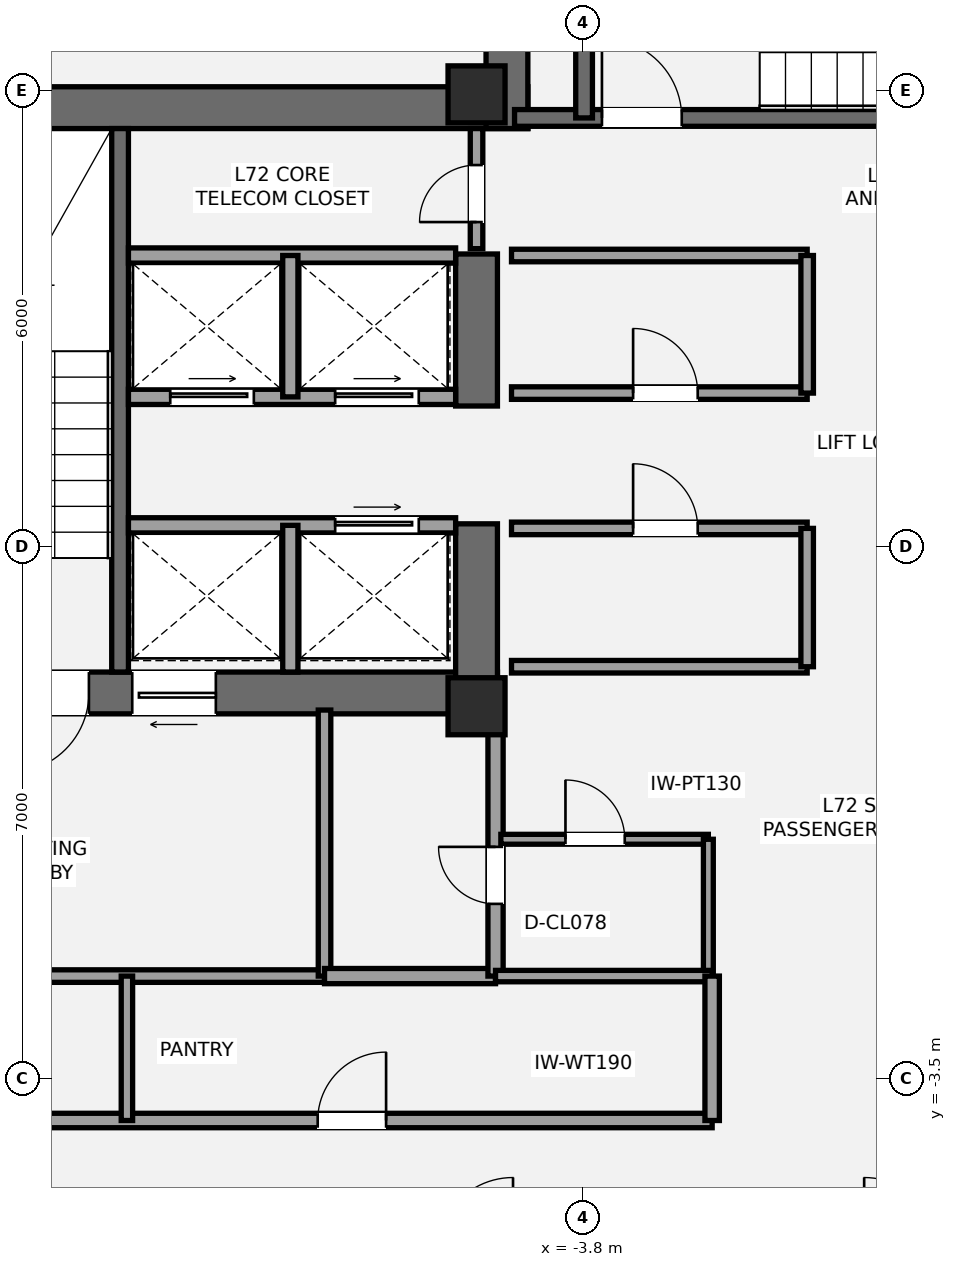
"""IFC4 building model, lengths in metres.
Left out: names, types, materials, properties, quantities, classifications, styles, units other than length and angle.
Written with IfcOpenShell. Run it as: python <this file> out.ifc"""

import sys

from ifc_helpers import new_model, si_unit, direction, frame, frame_2d, origin, origin_2d, place, context, subcontext, project, spatial, rectangle, extrude, element, fill, save


model = new_model("IFC4")
c1 = context("Model", 3, precision=1e-05, world=origin(), true_north=direction((0.0, 1.0)))
c2 = subcontext(c1, "Body", "Model", "MODEL_VIEW")
j1 = project(units=[si_unit("LENGTHUNIT", "METRE"), si_unit("PLANEANGLEUNIT", "RADIAN")], contexts=[c1])
p1 = place(None, origin())
s1 = spatial("IfcSite", under=j1, at=p1, CompositionType="ELEMENT")
p2 = place(p1, origin())
s2 = spatial("IfcBuilding", under=s1, at=p2, CompositionType="ELEMENT")
p3 = place(p2, frame((0.0, 0.0, 254.1)))
s3 = spatial("IfcBuildingStorey", under=s2, at=p3, CompositionType="ELEMENT", Elevation=254.1)
p4 = place(p3, frame((-13.7, 9.275, 0.0), z_axis=(0.0, 0.0, 1.0), x_axis=(1.0, 0.0, 0.0)))
e1 = element("IfcWall", 1, at=p4, inside=s3, PredefinedType="SHEAR", context=c2, shape_type="SweptSolid", body=[
    extrude(rectangle(XDim=9.175, YDim=0.55, at=frame_2d((4.587, 0.0))), origin(), (0.0, 0.0, 1.0), 3.15),
])
p5 = place(p3, frame((-4.925, 1.575, 0.0), z_axis=(0.0, 0.0, 1.0), x_axis=(-1.0, 0.0, 0.0)))
e2 = element("IfcWall", 2, at=p5, inside=s3, PredefinedType="SHEAR", context=c2, shape_type="SweptSolid", body=[
    extrude(rectangle(XDim=8.775, YDim=0.55, at=frame_2d((4.387, 0.0))), origin(), (0.0, 0.0, 1.0), 3.15),
])
p6 = place(p5, frame((5.375, 0.0, 0.0)))
e3 = element("IfcOpeningElement", 3, at=p6, cuts=e2, PredefinedType="OPENING", context=c2, shape_type="SweptSolid", body=[
    extrude(rectangle(XDim=1.05, YDim=2.15, at=frame_2d((0.525, 1.075))), frame((0.0, 0.285, 0.0), z_axis=(0.0, -1.0, 0.0), x_axis=(1.0, 0.0, 0.0)), (0.0, 0.0, 1.0), 0.57),
])
p7 = place(p5, frame((3.705, 0.0, 0.0)))
e4 = element("IfcOpeningElement", 4, at=p7, cuts=e2, PredefinedType="OPENING", context=c2, shape_type="SweptSolid", body=[
    extrude(rectangle(XDim=1.1, YDim=2.2, at=frame_2d((0.55, 1.1))), frame((0.0, 0.285, 0.0), z_axis=(0.0, -1.0, 0.0), x_axis=(1.0, 0.0, 0.0)), (0.0, 0.0, 1.0), 0.57),
])
p8 = place(p3, frame((-5.2, 1.3, 0.0), z_axis=(0.0, 0.0, 1.0), x_axis=(0.0, 1.0, 0.0)))
e5 = element("IfcWall", 5, at=p8, inside=s3, PredefinedType="SHEAR", context=c2, shape_type="SweptSolid", body=[
    extrude(rectangle(XDim=2.5, YDim=0.55, at=frame_2d((1.25, 0.0))), origin(), (0.0, 0.0, 1.0), 3.15),
])
p9 = place(p3, frame((-5.2, 5.35, 0.0), z_axis=(0.0, 0.0, 1.0), x_axis=(0.0, 1.0, 0.0)))
e6 = element("IfcWall", 6, at=p9, inside=s3, PredefinedType="SHEAR", context=c2, shape_type="SweptSolid", body=[
    extrude(rectangle(XDim=2.0, YDim=0.55, at=frame_2d((1.0, 0.0))), origin(), (0.0, 0.0, 1.0), 3.15),
])
p10 = place(p3, frame((-9.89, 1.85, 0.0), z_axis=(0.0, 0.0, 1.0), x_axis=(0.0, 1.0, 0.0)))
e7 = element("IfcWall", 7, at=p10, inside=s3, PredefinedType="SHEAR", context=c2, shape_type="SweptSolid", body=[
    extrude(rectangle(XDim=7.15, YDim=0.22, at=frame_2d((3.575, 0.0))), origin(), (0.0, 0.0, 1.0), 3.15),
])
p11 = place(p3, frame((-4.8, 9.0, 0.0), z_axis=(0.0, 0.0, 1.0), x_axis=(0.0, 1.0, 0.0)))
e8 = element("IfcWall", 8, at=p11, inside=s3, PredefinedType="SHEAR", context=c2, shape_type="SweptSolid", body=[
    extrude(rectangle(XDim=3.95, YDim=0.55, at=frame_2d((1.975, 0.0))), origin(), (0.0, 0.0, 1.0), 3.15),
])
p12 = place(p3, frame((-4.7, 9.14, 0.0), z_axis=(0.0, 0.0, 1.0), x_axis=(1.0, 0.0, 0.0)))
e9 = element("IfcWall", 9, at=p12, inside=s3, PredefinedType="SHEAR", context=c2, shape_type="SweptSolid", body=[
    extrude(rectangle(XDim=9.3, YDim=0.22, at=frame_2d((4.65, 0.0))), origin(), (0.0, 0.0, 1.0), 3.15),
])
p13 = place(p12, frame((1.15, 0.0, 0.0)))
e10 = element("IfcOpeningElement", 10, at=p13, cuts=e9, PredefinedType="OPENING", context=c2, shape_type="SweptSolid", body=[
    extrude(rectangle(XDim=1.05, YDim=2.15, at=frame_2d((0.525, 1.075))), frame((0.0, 0.12, 0.0), z_axis=(0.0, -1.0, 0.0), x_axis=(1.0, 0.0, 0.0)), (0.0, 0.0, 1.0), 0.24),
])
p14 = place(p3, frame((-3.785, 9.14, 0.0), z_axis=(0.0, 0.0, 1.0), x_axis=(0.0, 1.0, 0.0)))
e11 = element("IfcWall", 11, at=p14, inside=s3, PredefinedType="SHEAR", context=c2, shape_type="SweptSolid", body=[
    extrude(rectangle(XDim=3.26, YDim=0.22, at=frame_2d((1.63, 0.0))), origin(), (0.0, 0.0, 1.0), 3.15),
])
for number, where, z_axis, x_axis in (
    (12, (-5.2, 1.4, 0.0), (0.0, 0.0, 1.0), (1.0, 0.0, 0.0)),
    (13, (-5.2, 9.45, 0.0), (0.0, 0.0, 1.0), (1.0, 0.0, 0.0)),
):
    element("IfcColumn", number, at=place(p3, frame(where, z_axis=z_axis, x_axis=x_axis)), inside=s3, PredefinedType="PILASTER", context=c2, shape_type="SweptSolid", body=[
        extrude(rectangle(XDim=0.75, YDim=0.75, at=origin_2d()), origin(), (0.0, 0.0, 1.0), 3.15),
    ])
p15 = place(p3, frame((-13.45, -2.15, 0.0), z_axis=(0.0, 0.0, 1.0), x_axis=(1.0, 0.0, 0.0)))
e14 = element("IfcWall", 14, at=p15, inside=s3, PredefinedType="PARTITIONING", context=c2, shape_type="SweptSolid", body=[
    extrude(rectangle(XDim=6.25, YDim=0.165, at=frame_2d((3.125, 0.0))), origin(), (0.0, 0.0, 1.0), 2.423),
])
p16 = place(p3, frame((-7.2, -2.15, 0.0), z_axis=(0.0, 0.0, 1.0), x_axis=(0.0, 1.0, 0.0)))
e15 = element("IfcWall", 15, at=p16, inside=s3, PredefinedType="PARTITIONING", context=c2, shape_type="SweptSolid", body=[
    extrude(rectangle(XDim=3.5, YDim=0.165, at=frame_2d((1.75, 0.0))), origin(), (0.0, 0.0, 1.0), 2.423),
])
p17 = place(p3, frame((-7.2, -2.15, 0.0), z_axis=(0.0, 0.0, 1.0), x_axis=(1.0, 0.0, 0.0)))
e16 = element("IfcWall", 16, at=p17, inside=s3, PredefinedType="SOLIDWALL", context=c2, shape_type="SweptSolid", body=[
    extrude(rectangle(XDim=2.25, YDim=0.2, at=frame_2d((1.125, 0.0))), origin(), (0.0, 0.0, 1.0), 2.97),
])
p18 = place(p3, frame((-4.95, -2.15, 0.0), z_axis=(0.0, 0.0, 1.0), x_axis=(0.0, 1.0, 0.0)))
e17 = element("IfcWall", 17, at=p18, inside=s3, PredefinedType="SOLIDWALL", context=c2, shape_type="SweptSolid", body=[
    extrude(rectangle(XDim=3.5, YDim=0.2, at=frame_2d((1.75, 0.0))), origin(), (0.0, 0.0, 1.0), 2.423),
])
p19 = place(p18, frame((0.95, 0.0, 0.0)))
e18 = element("IfcOpeningElement", 18, at=p19, cuts=e17, PredefinedType="OPENING", context=c2, shape_type="SweptSolid", body=[
    extrude(rectangle(XDim=0.75, YDim=2.1, at=frame_2d((0.375, 1.05))), frame((0.0, 0.11, 0.0), z_axis=(0.0, -1.0, 0.0), x_axis=(1.0, 0.0, 0.0)), (0.0, 0.0, 1.0), 0.22),
])
p20 = place(p3, frame((-4.88, -0.35, 0.0), z_axis=(0.0, 0.0, 1.0), x_axis=(1.0, 0.0, 0.0)))
e19 = element("IfcWall", 19, at=p20, inside=s3, PredefinedType="PARTITIONING", context=c2, shape_type="SweptSolid", body=[
    extrude(rectangle(XDim=2.73, YDim=0.13, at=frame_2d((1.365, 0.0))), origin(), (0.0, 0.0, 1.0), 2.97),
])
p21 = place(p20, frame((0.85, 0.0, 0.0)))
e20 = element("IfcOpeningElement", 20, at=p21, cuts=e19, PredefinedType="OPENING", context=c2, shape_type="SweptSolid", body=[
    extrude(rectangle(XDim=0.78, YDim=2.1, at=frame_2d((0.39, 1.05))), frame((0.0, 0.075, 0.0), z_axis=(0.0, -1.0, 0.0), x_axis=(1.0, 0.0, 0.0)), (0.0, 0.0, 1.0), 0.15),
])
p22 = place(p3, frame((-2.15, -2.15, 0.0), z_axis=(0.0, 0.0, 1.0), x_axis=(0.0, 1.0, 0.0)))
e21 = element("IfcWall", 21, at=p22, inside=s3, PredefinedType="PARTITIONING", context=c2, shape_type="SweptSolid", body=[
    extrude(rectangle(XDim=1.8, YDim=0.13, at=frame_2d((0.9, 0.0))), origin(), (0.0, 0.0, 1.0), 2.97),
])
p23 = place(p3, frame((-9.78, 3.78, 0.0), z_axis=(0.0, 0.0, 1.0), x_axis=(1.0, 0.0, 0.0)))
e22 = element("IfcWall", 22, at=p23, inside=s3, PredefinedType="SOLIDWALL", context=c2, shape_type="SweptSolid", body=[
    extrude(rectangle(XDim=4.305, YDim=0.2, at=frame_2d((2.152, 0.0))), origin(), (0.0, 0.0, 1.0), 2.97),
])
p24 = place(p23, frame((2.72, 0.0, 0.0)))
e23 = element("IfcOpeningElement", 23, at=p24, cuts=e22, PredefinedType="OPENING", context=c2, shape_type="SweptSolid", body=[
    extrude(rectangle(XDim=1.1, YDim=2.2, at=frame_2d((0.55, 1.1))), frame((0.0, 0.11, 0.0), z_axis=(0.0, -1.0, 0.0), x_axis=(1.0, 0.0, 0.0)), (0.0, 0.0, 1.0), 0.22),
])
p25 = place(p3, frame((-7.65, 1.85, 0.0), z_axis=(0.0, 0.0, 1.0), x_axis=(0.0, 1.0, 0.0)))
e24 = element("IfcWall", 24, at=p25, inside=s3, PredefinedType="SOLIDWALL", context=c2, shape_type="SweptSolid", body=[
    extrude(rectangle(XDim=1.93, YDim=0.2, at=frame_2d((0.965, 0.0))), origin(), (0.0, 0.0, 1.0), 2.97),
])
p26 = place(p3, frame((-9.78, 5.47, 0.0), z_axis=(0.0, 0.0, 1.0), x_axis=(1.0, 0.0, 0.0)))
e25 = element("IfcWall", 25, at=p26, inside=s3, PredefinedType="SOLIDWALL", context=c2, shape_type="SweptSolid", body=[
    extrude(rectangle(XDim=4.305, YDim=0.2, at=frame_2d((2.152, 0.0))), origin(), (0.0, 0.0, 1.0), 2.97),
])
p27 = place(p26, frame((0.55, 0.0, 0.0)))
e26 = element("IfcOpeningElement", 26, at=p27, cuts=e25, PredefinedType="OPENING", context=c2, shape_type="SweptSolid", body=[
    extrude(rectangle(XDim=1.1, YDim=2.2, at=frame_2d((0.55, 1.1))), frame((0.0, 0.11, 0.0), z_axis=(0.0, -1.0, 0.0), x_axis=(1.0, 0.0, 0.0)), (0.0, 0.0, 1.0), 0.22),
])
p28 = place(p26, frame((2.72, 0.0, 0.0)))
e27 = element("IfcOpeningElement", 27, at=p28, cuts=e25, PredefinedType="OPENING", context=c2, shape_type="SweptSolid", body=[
    extrude(rectangle(XDim=1.1, YDim=2.2, at=frame_2d((0.55, 1.1))), frame((0.0, 0.11, 0.0), z_axis=(0.0, -1.0, 0.0), x_axis=(1.0, 0.0, 0.0)), (0.0, 0.0, 1.0), 0.22),
])
p29 = place(p3, frame((-9.78, 7.33, 0.0), z_axis=(0.0, 0.0, 1.0), x_axis=(1.0, 0.0, 0.0)))
e28 = element("IfcWall", 28, at=p29, inside=s3, PredefinedType="SOLIDWALL", context=c2, shape_type="SweptSolid", body=[
    extrude(rectangle(XDim=4.305, YDim=0.2, at=frame_2d((2.152, 0.0))), origin(), (0.0, 0.0, 1.0), 2.97),
])
p30 = place(p3, frame((-7.65, 5.47, 0.0), z_axis=(0.0, 0.0, 1.0), x_axis=(0.0, 1.0, 0.0)))
e29 = element("IfcWall", 29, at=p30, inside=s3, PredefinedType="SOLIDWALL", context=c2, shape_type="SweptSolid", body=[
    extrude(rectangle(XDim=1.86, YDim=0.2, at=frame_2d((0.93, 0.0))), origin(), (0.0, 0.0, 1.0), 2.97),
])
p31 = place(p3, frame((-4.74, 1.92, 0.0), z_axis=(0.0, 0.0, 1.0), x_axis=(1.0, 0.0, 0.0)))
e30 = element("IfcWall", 30, at=p31, inside=s3, PredefinedType="PARTITIONING", context=c2, shape_type="SweptSolid", body=[
    extrude(rectangle(XDim=3.89, YDim=0.165, at=frame_2d((1.945, 0.0))), origin(), (0.0, 0.0, 1.0), 2.11),
])
p32 = place(p3, frame((-4.74, 3.74, 0.0), z_axis=(0.0, 0.0, 1.0), x_axis=(1.0, 0.0, 0.0)))
e31 = element("IfcWall", 31, at=p32, inside=s3, PredefinedType="PARTITIONING", context=c2, shape_type="SweptSolid", body=[
    extrude(rectangle(XDim=3.89, YDim=0.165, at=frame_2d((1.945, 0.0))), origin(), (0.0, 0.0, 1.0), 2.97),
])
p33 = place(p32, frame((1.6, 0.0, 0.0)))
e32 = element("IfcOpeningElement", 32, at=p33, cuts=e31, PredefinedType="OPENING", context=c2, shape_type="SweptSolid", body=[
    extrude(rectangle(XDim=0.85, YDim=2.1, at=frame_2d((0.425, 1.05))), frame((0.0, 0.093, 0.0), z_axis=(0.0, -1.0, 0.0), x_axis=(1.0, 0.0, 0.0)), (0.0, 0.0, 1.0), 0.185),
])
p34 = place(p3, frame((-0.85, 1.92, 0.0), z_axis=(0.0, 0.0, 1.0), x_axis=(0.0, 1.0, 0.0)))
e33 = element("IfcWall", 33, at=p34, inside=s3, PredefinedType="PARTITIONING", context=c2, shape_type="SweptSolid", body=[
    extrude(rectangle(XDim=1.82, YDim=0.165, at=frame_2d((0.91, 0.0))), origin(), (0.0, 0.0, 1.0), 2.97),
])
p35 = place(p3, frame((-4.74, 5.52, 0.0), z_axis=(0.0, 0.0, 1.0), x_axis=(1.0, 0.0, 0.0)))
e34 = element("IfcWall", 34, at=p35, inside=s3, PredefinedType="PARTITIONING", context=c2, shape_type="SweptSolid", body=[
    extrude(rectangle(XDim=3.89, YDim=0.165, at=frame_2d((1.945, 0.0))), origin(), (0.0, 0.0, 1.0), 2.97),
])
p36 = place(p35, frame((1.6, 0.0, 0.0)))
e35 = element("IfcOpeningElement", 35, at=p36, cuts=e34, PredefinedType="OPENING", context=c2, shape_type="SweptSolid", body=[
    extrude(rectangle(XDim=0.85, YDim=2.1, at=frame_2d((0.425, 1.05))), frame((0.0, 0.093, 0.0), z_axis=(0.0, -1.0, 0.0), x_axis=(1.0, 0.0, 0.0)), (0.0, 0.0, 1.0), 0.185),
])
p37 = place(p3, frame((-4.74, 7.33, 0.0), z_axis=(0.0, 0.0, 1.0), x_axis=(1.0, 0.0, 0.0)))
e36 = element("IfcWall", 36, at=p37, inside=s3, PredefinedType="PARTITIONING", context=c2, shape_type="SweptSolid", body=[
    extrude(rectangle(XDim=3.89, YDim=0.165, at=frame_2d((1.945, 0.0))), origin(), (0.0, 0.0, 1.0), 2.97),
])
p38 = place(p3, frame((-0.85, 5.52, 0.0), z_axis=(0.0, 0.0, 1.0), x_axis=(0.0, 1.0, 0.0)))
e37 = element("IfcWall", 37, at=p38, inside=s3, PredefinedType="PARTITIONING", context=c2, shape_type="SweptSolid", body=[
    extrude(rectangle(XDim=1.81, YDim=0.165, at=frame_2d((0.905, 0.0))), origin(), (0.0, 0.0, 1.0), 2.97),
])
p39 = place(p3, frame((-5.2, 7.42, 0.0), z_axis=(0.0, 0.0, 1.0), x_axis=(0.0, 1.0, 0.0)))
e38 = element("IfcWall", 38, at=p39, inside=s3, PredefinedType="PARTITIONING", context=c2, shape_type="SweptSolid", body=[
    extrude(rectangle(XDim=1.58, YDim=0.165, at=frame_2d((0.79, 0.0))), origin(), (0.0, 0.0, 1.0), 2.97),
])
p40 = place(p39, frame((0.35, 0.0, 0.0)))
e39 = element("IfcOpeningElement", 39, at=p40, cuts=e38, PredefinedType="OPENING", context=c2, shape_type="SweptSolid", body=[
    extrude(rectangle(XDim=0.75, YDim=2.1, at=frame_2d((0.375, 1.05))), frame((0.0, 0.093, 0.0), z_axis=(0.0, -1.0, 0.0), x_axis=(1.0, 0.0, 0.0)), (0.0, 0.0, 1.0), 0.185),
])
p41 = place(p3, frame((-13.45, -4.05, 0.0), z_axis=(0.0, 0.0, 1.0), x_axis=(1.0, 0.0, 0.0)))
e40 = element("IfcWall", 40, at=p41, inside=s3, PredefinedType="PLUMBINGWALL", context=c2, shape_type="SweptSolid", body=[
    extrude(rectangle(XDim=11.35, YDim=0.19, at=frame_2d((5.675, 0.0))), origin(), (0.0, 0.0, 1.0), 2.357),
])
p42 = place(p41, frame((1.25, 0.0, 0.0)))
e41 = element("IfcOpeningElement", 41, at=p42, cuts=e40, PredefinedType="OPENING", context=c2, shape_type="SweptSolid", body=[
    extrude(rectangle(XDim=0.95, YDim=2.15, at=frame_2d((0.475, 1.075))), frame((0.0, 0.105, 0.0), z_axis=(0.0, -1.0, 0.0), x_axis=(1.0, 0.0, 0.0)), (0.0, 0.0, 1.0), 0.21),
])
p43 = place(p41, frame((6.16, 0.0, 0.0)))
e42 = element("IfcOpeningElement", 42, at=p43, cuts=e40, PredefinedType="OPENING", context=c2, shape_type="SweptSolid", body=[
    extrude(rectangle(XDim=0.9, YDim=2.1, at=frame_2d((0.45, 1.05))), frame((0.0, 0.105, 0.0), z_axis=(0.0, -1.0, 0.0), x_axis=(1.0, 0.0, 0.0)), (0.0, 0.0, 1.0), 0.21),
])
p44 = place(p3, frame((-4.95, -2.15, 0.0), z_axis=(0.0, 0.0, 1.0), x_axis=(1.0, 0.0, 0.0)))
e43 = element("IfcWall", 43, at=p44, inside=s3, PredefinedType="PLUMBINGWALL", context=c2, shape_type="SweptSolid", body=[
    extrude(rectangle(XDim=2.85, YDim=0.15, at=frame_2d((1.425, 0.0))), origin(), (0.0, 0.0, 1.0), 2.423),
])
p45 = place(p3, frame((-2.1, -4.05, 0.0), z_axis=(0.0, 0.0, 1.0), x_axis=(0.0, 1.0, 0.0)))
e44 = element("IfcWall", 44, at=p45, inside=s3, PredefinedType="PLUMBINGWALL", context=c2, shape_type="SweptSolid", body=[
    extrude(rectangle(XDim=1.9, YDim=0.19, at=frame_2d((0.95, 0.0))), origin(), (0.0, 0.0, 1.0), 2.423),
])
p46 = place(p3, frame((-9.8, -4.05, 0.0), z_axis=(0.0, 0.0, 1.0), x_axis=(0.0, 1.0, 0.0)))
e45 = element("IfcWall", 45, at=p46, inside=s3, PredefinedType="PLUMBINGWALL", context=c2, shape_type="SweptSolid", body=[
    extrude(rectangle(XDim=1.9, YDim=0.15, at=frame_2d((0.95, 0.0))), origin(), (0.0, 0.0, 1.0), 2.97),
])
p47 = place(p6, origin())
e46 = element("IfcDoor", 46, at=p47, inside=s3, OperationType="SINGLE_SWING_RIGHT", PredefinedType="DOOR", context=c2, shape_type="SweptSolid", body=[
    extrude(rectangle(XDim=1.05, YDim=2.15, at=frame_2d((0.525, 1.075))), frame((0.0, 0.025, 0.0), z_axis=(0.0, -1.0, 0.0), x_axis=(1.0, 0.0, 0.0)), (0.0, 0.0, 1.0), 0.05),
])
fill(e3, e46)
p48 = place(p13, origin())
e47 = element("IfcDoor", 47, at=p48, inside=s3, OperationType="SINGLE_SWING_LEFT", PredefinedType="DOOR", context=c2, shape_type="SweptSolid", body=[
    extrude(rectangle(XDim=1.05, YDim=2.15, at=frame_2d((0.525, 1.075))), frame((0.0, 0.025, 0.0), z_axis=(0.0, -1.0, 0.0), x_axis=(1.0, 0.0, 0.0)), (0.0, 0.0, 1.0), 0.05),
])
fill(e10, e47)
p49 = place(p19, origin())
e48 = element("IfcDoor", 48, at=p49, inside=s3, OperationType="SINGLE_SWING_RIGHT", PredefinedType="DOOR", context=c2, shape_type="SweptSolid", body=[
    extrude(rectangle(XDim=0.75, YDim=2.1, at=frame_2d((0.375, 1.05))), frame((0.0, 0.025, 0.0), z_axis=(0.0, -1.0, 0.0), x_axis=(1.0, 0.0, 0.0)), (0.0, 0.0, 1.0), 0.05),
])
fill(e18, e48)
p50 = place(p21, origin())
e49 = element("IfcDoor", 49, at=p50, inside=s3, OperationType="SINGLE_SWING_LEFT", PredefinedType="DOOR", context=c2, shape_type="SweptSolid", body=[
    extrude(rectangle(XDim=0.78, YDim=2.1, at=frame_2d((0.39, 1.05))), frame((0.0, 0.025, 0.0), z_axis=(0.0, -1.0, 0.0), x_axis=(1.0, 0.0, 0.0)), (0.0, 0.0, 1.0), 0.05),
])
fill(e20, e49)
p51 = place(p7, origin())
e50 = element("IfcDoor", 50, at=p51, inside=s3, OperationType="SLIDING_TO_LEFT", PredefinedType="DOOR", context=c2, shape_type="SweptSolid", body=[
    extrude(rectangle(XDim=1.1, YDim=2.2, at=frame_2d((0.55, 1.1))), frame((0.0, 0.025, 0.0), z_axis=(0.0, -1.0, 0.0), x_axis=(1.0, 0.0, 0.0)), (0.0, 0.0, 1.0), 0.05),
])
fill(e4, e50)
p52 = place(p27, origin())
e51 = element("IfcDoor", 51, at=p52, inside=s3, OperationType="SLIDING_TO_LEFT", PredefinedType="DOOR", context=c2, shape_type="SweptSolid", body=[
    extrude(rectangle(XDim=1.1, YDim=2.2, at=frame_2d((0.55, 1.1))), frame((0.0, 0.025, 0.0), z_axis=(0.0, -1.0, 0.0), x_axis=(1.0, 0.0, 0.0)), (0.0, 0.0, 1.0), 0.05),
])
fill(e26, e51)
p53 = place(p28, origin())
e52 = element("IfcDoor", 52, at=p53, inside=s3, OperationType="SLIDING_TO_LEFT", PredefinedType="DOOR", context=c2, shape_type="SweptSolid", body=[
    extrude(rectangle(XDim=1.1, YDim=2.2, at=frame_2d((0.55, 1.1))), frame((0.0, 0.025, 0.0), z_axis=(0.0, -1.0, 0.0), x_axis=(1.0, 0.0, 0.0)), (0.0, 0.0, 1.0), 0.05),
])
fill(e27, e52)
p54 = place(p24, origin())
e53 = element("IfcDoor", 53, at=p54, inside=s3, OperationType="SLIDING_TO_LEFT", PredefinedType="DOOR", context=c2, shape_type="SweptSolid", body=[
    extrude(rectangle(XDim=1.1, YDim=2.2, at=frame_2d((0.55, 1.1))), frame((0.0, 0.025, 0.0), z_axis=(0.0, -1.0, 0.0), x_axis=(1.0, 0.0, 0.0)), (0.0, 0.0, 1.0), 0.05),
])
fill(e23, e53)
p55 = place(p33, origin())
e54 = element("IfcDoor", 54, at=p55, inside=s3, OperationType="SINGLE_SWING_LEFT", PredefinedType="DOOR", context=c2, shape_type="SweptSolid", body=[
    extrude(rectangle(XDim=0.85, YDim=2.1, at=frame_2d((0.425, 1.05))), frame((0.0, 0.025, 0.0), z_axis=(0.0, -1.0, 0.0), x_axis=(1.0, 0.0, 0.0)), (0.0, 0.0, 1.0), 0.05),
])
fill(e32, e54)
p56 = place(p36, origin())
e55 = element("IfcDoor", 55, at=p56, inside=s3, OperationType="SINGLE_SWING_LEFT", PredefinedType="DOOR", context=c2, shape_type="SweptSolid", body=[
    extrude(rectangle(XDim=0.85, YDim=2.1, at=frame_2d((0.425, 1.05))), frame((0.0, 0.025, 0.0), z_axis=(0.0, -1.0, 0.0), x_axis=(1.0, 0.0, 0.0)), (0.0, 0.0, 1.0), 0.05),
])
fill(e35, e55)
p57 = place(p40, origin())
e56 = element("IfcDoor", 56, at=p57, inside=s3, OperationType="SINGLE_SWING_LEFT", PredefinedType="DOOR", context=c2, shape_type="SweptSolid", body=[
    extrude(rectangle(XDim=0.75, YDim=2.1, at=frame_2d((0.375, 1.05))), frame((0.0, 0.025, 0.0), z_axis=(0.0, -1.0, 0.0), x_axis=(1.0, 0.0, 0.0)), (0.0, 0.0, 1.0), 0.05),
])
fill(e39, e56)
p58 = place(p43, origin())
e57 = element("IfcDoor", 57, at=p58, inside=s3, OperationType="SINGLE_SWING_RIGHT", PredefinedType="DOOR", context=c2, shape_type="SweptSolid", body=[
    extrude(rectangle(XDim=0.9, YDim=2.1, at=frame_2d((0.45, 1.05))), frame((0.0, 0.025, 0.0), z_axis=(0.0, -1.0, 0.0), x_axis=(1.0, 0.0, 0.0)), (0.0, 0.0, 1.0), 0.05),
])
fill(e42, e57)
save(model, sys.argv[1])
